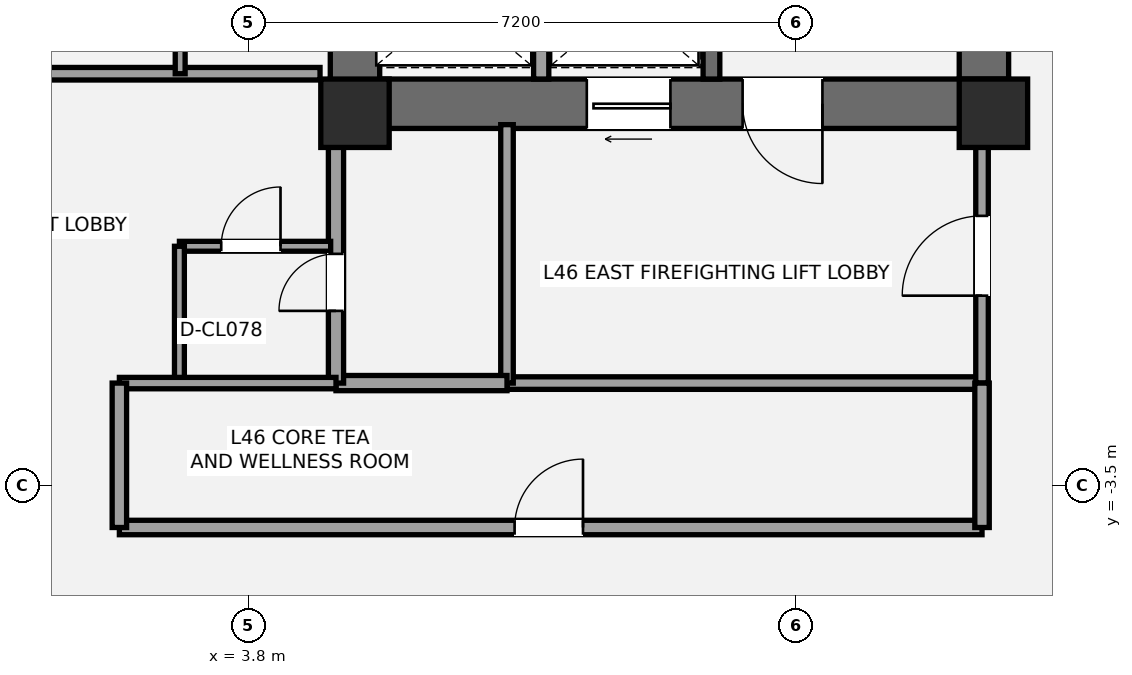
"""IFC4 building model, lengths in metres.
Left out: names, types, materials, properties, quantities, classifications, styles, units other than length and angle.
Written with IfcOpenShell. Run it as: python <this file> out.ifc"""

import sys

from ifc_helpers import new_model, si_unit, direction, frame, frame_2d, origin, origin_2d, place, context, subcontext, project, spatial, rectangle, extrude, element, fill, save


model = new_model("IFC4")
c1 = context("Model", 3, precision=1e-05, world=origin(), true_north=direction((0.0, 1.0)))
c2 = subcontext(c1, "Body", "Model", "MODEL_VIEW")
j1 = project(units=[si_unit("LENGTHUNIT", "METRE"), si_unit("PLANEANGLEUNIT", "RADIAN")], contexts=[c1])
p1 = place(None, origin())
s1 = spatial("IfcSite", under=j1, at=p1, CompositionType="ELEMENT")
p2 = place(p1, origin())
s2 = spatial("IfcBuilding", under=s1, at=p2, CompositionType="ELEMENT")
p3 = place(p2, frame((0.0, 0.0, 169.4)))
s3 = spatial("IfcBuildingStorey", under=s2, at=p3, CompositionType="ELEMENT", Elevation=169.4)
p4 = place(p3, frame((13.475, 1.2, 0.0), z_axis=(0.0, 0.0, 1.0), x_axis=(0.0, 1.0, 0.0)))
e1 = element("IfcWall", 1, at=p4, inside=s3, PredefinedType="SHEAR", context=c2, shape_type="SweptSolid", body=[
    extrude(rectangle(XDim=8.45, YDim=0.65, at=frame_2d((4.225, 0.0))), origin(), (0.0, 0.0, 1.0), 3.2),
])
p5 = place(p3, frame((13.8, 1.525, 0.0), z_axis=(0.0, 0.0, 1.0), x_axis=(-1.0, 0.0, 0.0)))
e2 = element("IfcWall", 2, at=p5, inside=s3, PredefinedType="SHEAR", context=c2, shape_type="SweptSolid", body=[
    extrude(rectangle(XDim=8.925, YDim=0.65, at=frame_2d((4.462, 0.0))), origin(), (0.0, 0.0, 1.0), 3.2),
])
p6 = place(p5, frame((2.45, 0.0, 0.0)))
e3 = element("IfcOpeningElement", 3, at=p6, cuts=e2, PredefinedType="OPENING", context=c2, shape_type="SweptSolid", body=[
    extrude(rectangle(XDim=1.05, YDim=2.15, at=frame_2d((0.525, 1.075))), frame((0.0, 0.335, 0.0), z_axis=(0.0, -1.0, 0.0), x_axis=(1.0, 0.0, 0.0)), (0.0, 0.0, 1.0), 0.67),
])
p7 = place(p5, frame((4.45, 0.0, 0.0)))
e4 = element("IfcOpeningElement", 4, at=p7, cuts=e2, PredefinedType="OPENING", context=c2, shape_type="SweptSolid", body=[
    extrude(rectangle(XDim=1.1, YDim=2.2, at=frame_2d((0.55, 1.1))), frame((0.0, 0.335, 0.0), z_axis=(0.0, -1.0, 0.0), x_axis=(1.0, 0.0, 0.0)), (0.0, 0.0, 1.0), 0.67),
])
p8 = place(p3, frame((5.2, 1.2, 0.0), z_axis=(0.0, 0.0, 1.0), x_axis=(0.0, 1.0, 0.0)))
e5 = element("IfcWall", 5, at=p8, inside=s3, PredefinedType="SHEAR", context=c2, shape_type="SweptSolid", body=[
    extrude(rectangle(XDim=2.6, YDim=0.65, at=frame_2d((1.3, 0.0))), origin(), (0.0, 0.0, 1.0), 3.2),
])
p9 = place(p3, frame((9.89, 1.85, 0.0), z_axis=(0.0, 0.0, 1.0), x_axis=(0.0, 1.0, 0.0)))
e6 = element("IfcWall", 6, at=p9, inside=s3, PredefinedType="SHEAR", context=c2, shape_type="SweptSolid", body=[
    extrude(rectangle(XDim=7.15, YDim=0.22, at=frame_2d((3.575, 0.0))), origin(), (0.0, 0.0, 1.0), 3.2),
])
for number, where, z_axis, x_axis in (
    (7, (5.2, 1.4, 0.0), (0.0, 0.0, 1.0), (1.0, 0.0, 0.0)),
    (8, (13.6, 1.4, 0.0), (0.0, 0.0, 1.0), (1.0, 0.0, 0.0)),
):
    element("IfcColumn", number, at=place(p3, frame(where, z_axis=z_axis, x_axis=x_axis)), inside=s3, PredefinedType="COLUMN", context=c2, shape_type="SweptSolid", body=[
        extrude(rectangle(XDim=0.9, YDim=0.9, at=origin_2d()), origin(), (0.0, 0.0, 1.0), 3.2),
    ])
p10 = place(p3, frame((7.2, -2.15, 0.0), z_axis=(0.0, 0.0, 1.0), x_axis=(1.0, 0.0, 0.0)))
e9 = element("IfcWall", 9, at=p10, inside=s3, PredefinedType="PARTITIONING", context=c2, shape_type="SweptSolid", body=[
    extrude(rectangle(XDim=6.25, YDim=0.165, at=frame_2d((3.125, 0.0))), origin(), (0.0, 0.0, 1.0), 3.02),
])
p11 = place(p3, frame((7.2, -2.15, 0.0), z_axis=(0.0, 0.0, 1.0), x_axis=(0.0, 1.0, 0.0)))
e10 = element("IfcWall", 10, at=p11, inside=s3, PredefinedType="PARTITIONING", context=c2, shape_type="SweptSolid", body=[
    extrude(rectangle(XDim=3.4, YDim=0.165, at=frame_2d((1.7, 0.0))), origin(), (0.0, 0.0, 1.0), 2.473),
])
p12 = place(p3, frame((13.45, -2.15, 0.0), z_axis=(0.0, 0.0, 1.0), x_axis=(0.0, 1.0, 0.0)))
e11 = element("IfcWall", 11, at=p12, inside=s3, PredefinedType="PARTITIONING", context=c2, shape_type="SweptSolid", body=[
    extrude(rectangle(XDim=3.4, YDim=0.165, at=frame_2d((1.7, 0.0))), origin(), (0.0, 0.0, 1.0), 2.473),
])
p13 = place(p12, frame((1.15, 0.0, 0.0)))
e12 = element("IfcOpeningElement", 12, at=p13, cuts=e11, PredefinedType="OPENING", context=c2, shape_type="SweptSolid", body=[
    extrude(rectangle(XDim=1.05, YDim=2.15, at=frame_2d((0.525, 1.075))), frame((0.0, 0.093, 0.0), z_axis=(0.0, -1.0, 0.0), x_axis=(1.0, 0.0, 0.0)), (0.0, 0.0, 1.0), 0.185),
])
p14 = place(p3, frame((4.95, -2.15, 0.0), z_axis=(0.0, 0.0, 1.0), x_axis=(1.0, 0.0, 0.0)))
e13 = element("IfcWall", 13, at=p14, inside=s3, PredefinedType="SOLIDWALL", context=c2, shape_type="SweptSolid", body=[
    extrude(rectangle(XDim=2.25, YDim=0.2, at=frame_2d((1.125, 0.0))), origin(), (0.0, 0.0, 1.0), 3.02),
])
p15 = place(p3, frame((4.95, -2.15, 0.0), z_axis=(0.0, 0.0, 1.0), x_axis=(0.0, 1.0, 0.0)))
e14 = element("IfcWall", 14, at=p15, inside=s3, PredefinedType="SOLIDWALL", context=c2, shape_type="SweptSolid", body=[
    extrude(rectangle(XDim=3.4, YDim=0.2, at=frame_2d((1.7, 0.0))), origin(), (0.0, 0.0, 1.0), 2.473),
])
p16 = place(p15, frame((0.95, 0.0, 0.0)))
e15 = element("IfcOpeningElement", 15, at=p16, cuts=e14, PredefinedType="OPENING", context=c2, shape_type="SweptSolid", body=[
    extrude(rectangle(XDim=0.75, YDim=2.1, at=frame_2d((0.375, 1.05))), frame((0.0, 0.11, 0.0), z_axis=(0.0, -1.0, 0.0), x_axis=(1.0, 0.0, 0.0)), (0.0, 0.0, 1.0), 0.22),
])
p17 = place(p3, frame((2.89, -0.35, 0.0), z_axis=(0.0, 0.0, 1.0), x_axis=(1.0, 0.0, 0.0)))
e16 = element("IfcWall", 16, at=p17, inside=s3, PredefinedType="PARTITIONING", context=c2, shape_type="SweptSolid", body=[
    extrude(rectangle(XDim=1.99, YDim=0.13, at=frame_2d((0.995, 0.0))), origin(), (0.0, 0.0, 1.0), 3.02),
])
p18 = place(p17, frame((0.55, 0.0, 0.0)))
e17 = element("IfcOpeningElement", 17, at=p18, cuts=e16, PredefinedType="OPENING", context=c2, shape_type="SweptSolid", body=[
    extrude(rectangle(XDim=0.78, YDim=2.1, at=frame_2d((0.39, 1.05))), frame((0.0, 0.075, 0.0), z_axis=(0.0, -1.0, 0.0), x_axis=(1.0, 0.0, 0.0)), (0.0, 0.0, 1.0), 0.15),
])
p19 = place(p3, frame((2.89, -2.15, 0.0), z_axis=(0.0, 0.0, 1.0), x_axis=(0.0, 1.0, 0.0)))
e18 = element("IfcWall", 18, at=p19, inside=s3, PredefinedType="PARTITIONING", context=c2, shape_type="SweptSolid", body=[
    extrude(rectangle(XDim=1.8, YDim=0.13, at=frame_2d((0.9, 0.0))), origin(), (0.0, 0.0, 1.0), 3.02),
])
p20 = place(p3, frame((7.65, 1.85, 0.0), z_axis=(0.0, 0.0, 1.0), x_axis=(0.0, 1.0, 0.0)))
e19 = element("IfcWall", 19, at=p20, inside=s3, PredefinedType="SOLIDWALL", context=c2, shape_type="SweptSolid", body=[
    extrude(rectangle(XDim=1.97, YDim=0.2, at=frame_2d((0.985, 0.0))), origin(), (0.0, 0.0, 1.0), 3.02),
])
p21 = place(p3, frame((0.85, 1.92, 0.0), z_axis=(0.0, 0.0, 1.0), x_axis=(1.0, 0.0, 0.0)))
e20 = element("IfcWall", 20, at=p21, inside=s3, PredefinedType="PARTITIONING", context=c2, shape_type="SweptSolid", body=[
    extrude(rectangle(XDim=3.89, YDim=0.165, at=frame_2d((1.945, 0.0))), origin(), (0.0, 0.0, 1.0), 2.16),
])
p22 = place(p3, frame((2.9, 1.92, 0.0), z_axis=(0.0, 0.0, 1.0), x_axis=(0.0, 1.0, 0.0)))
e21 = element("IfcWall", 21, at=p22, inside=s3, PredefinedType="PARTITIONING", context=c2, shape_type="SweptSolid", body=[
    extrude(rectangle(XDim=1.82, YDim=0.13, at=frame_2d((0.91, 0.0))), origin(), (0.0, 0.0, 1.0), 3.02),
])
p23 = place(p3, frame((2.1, -4.05, 0.0), z_axis=(0.0, 0.0, 1.0), x_axis=(1.0, 0.0, 0.0)))
e22 = element("IfcWall", 22, at=p23, inside=s3, PredefinedType="PLUMBINGWALL", context=c2, shape_type="SweptSolid", body=[
    extrude(rectangle(XDim=11.35, YDim=0.19, at=frame_2d((5.675, 0.0))), origin(), (0.0, 0.0, 1.0), 3.02),
])
p24 = place(p23, frame((5.2, 0.0, 0.0)))
e23 = element("IfcOpeningElement", 23, at=p24, cuts=e22, PredefinedType="OPENING", context=c2, shape_type="SweptSolid", body=[
    extrude(rectangle(XDim=0.9, YDim=2.1, at=frame_2d((0.45, 1.05))), frame((0.0, 0.105, 0.0), z_axis=(0.0, -1.0, 0.0), x_axis=(1.0, 0.0, 0.0)), (0.0, 0.0, 1.0), 0.21),
])
p25 = place(p3, frame((2.1, -2.15, 0.0), z_axis=(0.0, 0.0, 1.0), x_axis=(1.0, 0.0, 0.0)))
e24 = element("IfcWall", 24, at=p25, inside=s3, PredefinedType="PLUMBINGWALL", context=c2, shape_type="SweptSolid", body=[
    extrude(rectangle(XDim=2.85, YDim=0.15, at=frame_2d((1.425, 0.0))), origin(), (0.0, 0.0, 1.0), 3.02),
])
p26 = place(p3, frame((2.1, -4.05, 0.0), z_axis=(0.0, 0.0, 1.0), x_axis=(0.0, 1.0, 0.0)))
e25 = element("IfcWall", 25, at=p26, inside=s3, PredefinedType="PLUMBINGWALL", context=c2, shape_type="SweptSolid", body=[
    extrude(rectangle(XDim=1.9, YDim=0.19, at=frame_2d((0.95, 0.0))), origin(), (0.0, 0.0, 1.0), 3.02),
])
p27 = place(p3, frame((13.45, -4.05, 0.0), z_axis=(0.0, 0.0, 1.0), x_axis=(0.0, 1.0, 0.0)))
e26 = element("IfcWall", 26, at=p27, inside=s3, PredefinedType="PLUMBINGWALL", context=c2, shape_type="SweptSolid", body=[
    extrude(rectangle(XDim=1.9, YDim=0.19, at=frame_2d((0.95, 0.0))), origin(), (0.0, 0.0, 1.0), 2.473),
])
p28 = place(p6, origin())
e27 = element("IfcDoor", 27, at=p28, inside=s3, OperationType="SINGLE_SWING_LEFT", PredefinedType="DOOR", context=c2, shape_type="SweptSolid", body=[
    extrude(rectangle(XDim=1.05, YDim=2.15, at=frame_2d((0.525, 1.075))), frame((0.0, 0.025, 0.0), z_axis=(0.0, -1.0, 0.0), x_axis=(1.0, 0.0, 0.0)), (0.0, 0.0, 1.0), 0.05),
])
fill(e3, e27)
p29 = place(p13, origin())
e28 = element("IfcDoor", 28, at=p29, inside=s3, OperationType="SINGLE_SWING_LEFT", PredefinedType="DOOR", context=c2, shape_type="SweptSolid", body=[
    extrude(rectangle(XDim=1.05, YDim=2.15, at=frame_2d((0.525, 1.075))), frame((0.0, 0.025, 0.0), z_axis=(0.0, -1.0, 0.0), x_axis=(1.0, 0.0, 0.0)), (0.0, 0.0, 1.0), 0.05),
])
fill(e12, e28)
p30 = place(p16, origin())
e29 = element("IfcDoor", 29, at=p30, inside=s3, OperationType="SINGLE_SWING_LEFT", PredefinedType="DOOR", context=c2, shape_type="SweptSolid", body=[
    extrude(rectangle(XDim=0.75, YDim=2.1, at=frame_2d((0.375, 1.05))), frame((0.0, 0.025, 0.0), z_axis=(0.0, -1.0, 0.0), x_axis=(1.0, 0.0, 0.0)), (0.0, 0.0, 1.0), 0.05),
])
fill(e15, e29)
p31 = place(p18, origin())
e30 = element("IfcDoor", 30, at=p31, inside=s3, OperationType="SINGLE_SWING_RIGHT", PredefinedType="DOOR", context=c2, shape_type="SweptSolid", body=[
    extrude(rectangle(XDim=0.78, YDim=2.1, at=frame_2d((0.39, 1.05))), frame((0.0, 0.025, 0.0), z_axis=(0.0, -1.0, 0.0), x_axis=(1.0, 0.0, 0.0)), (0.0, 0.0, 1.0), 0.05),
])
fill(e17, e30)
p32 = place(p7, origin())
e31 = element("IfcDoor", 31, at=p32, inside=s3, OperationType="SLIDING_TO_LEFT", PredefinedType="DOOR", context=c2, shape_type="SweptSolid", body=[
    extrude(rectangle(XDim=1.1, YDim=2.2, at=frame_2d((0.55, 1.1))), frame((0.0, 0.025, 0.0), z_axis=(0.0, -1.0, 0.0), x_axis=(1.0, 0.0, 0.0)), (0.0, 0.0, 1.0), 0.05),
])
fill(e4, e31)
p33 = place(p24, origin())
e32 = element("IfcDoor", 32, at=p33, inside=s3, OperationType="SINGLE_SWING_RIGHT", PredefinedType="DOOR", context=c2, shape_type="SweptSolid", body=[
    extrude(rectangle(XDim=0.9, YDim=2.1, at=frame_2d((0.45, 1.05))), frame((0.0, 0.025, 0.0), z_axis=(0.0, -1.0, 0.0), x_axis=(1.0, 0.0, 0.0)), (0.0, 0.0, 1.0), 0.05),
])
fill(e23, e32)
save(model, sys.argv[1])
